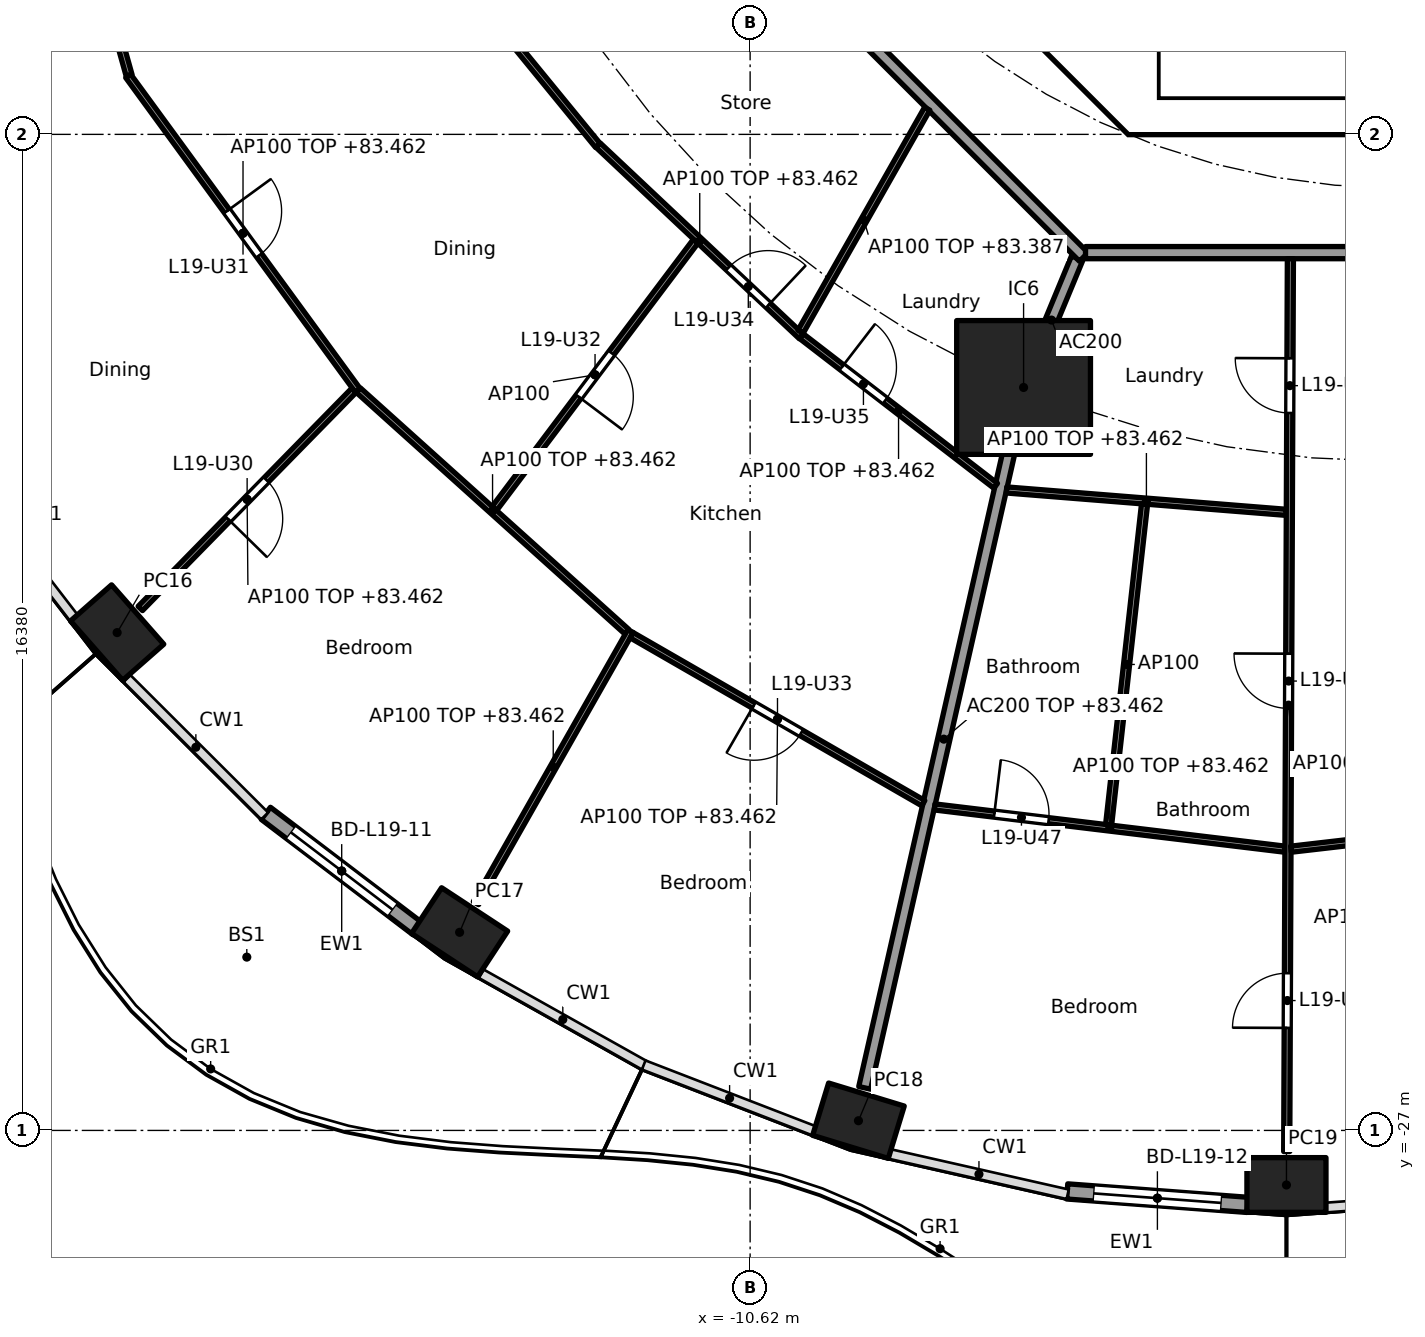
"""IFC4 building model, lengths in metres.
Left out: names, types, materials, properties, quantities, classifications, styles, units other than length and angle.
Written with IfcOpenShell. Run it as: python <this file> out.ifc"""

import sys

from ifc_helpers import new_model, si_unit, direction, frame, frame_2d, origin, origin_2d, place, context, subcontext, project, spatial, polyline, rectangle, hollow_rectangle, outline, extrude, element, fill, save


model = new_model("IFC4")
c1 = context("Model", 3, precision=1e-05, world=origin(), true_north=direction((0.0, 1.0)))
c2 = subcontext(c1, "Body", "Model", "MODEL_VIEW")
j1 = project(units=[si_unit("LENGTHUNIT", "METRE"), si_unit("PLANEANGLEUNIT", "RADIAN")], contexts=[c1])
p1 = place(None, origin())
s1 = spatial("IfcSite", under=j1, at=p1, CompositionType="ELEMENT")
p2 = place(p1, origin())
s2 = spatial("IfcBuilding", under=s1, at=p2, CompositionType="ELEMENT")
p3 = place(p2, frame((0.0, 0.0, 80.7)))
s3 = spatial("IfcBuildingStorey", under=s2, at=p3, CompositionType="ELEMENT", Elevation=80.7)
for number, where, z_axis, x_axis in (
    (1, (-21.03, -18.813, 0.0), (0.0, 0.0, 1.0), (0.66, -0.751, 0.0)),
    (2, (-15.397, -23.742, 0.0), (0.0, 0.0, 1.0), (0.836, -0.549, 0.0)),
    (3, (-8.839, -26.841, 0.0), (0.0, 0.0, 1.0), (0.957, -0.292, 0.0)),
    (4, (-1.8, -27.897, 0.0), (0.0, 0.0, 1.0), (1.0, 0.0, 0.0)),
):
    element("IfcColumn", number, at=place(p3, frame(where, z_axis=z_axis, x_axis=x_axis)), inside=s3, PredefinedType="COLUMN", context=c2, shape_type="SweptSolid", body=[
        extrude(hollow_rectangle(XDim=1.3, YDim=0.9, WallThickness=0.045, at=origin_2d()), origin(), (0.0, 0.0, 1.0), 3.7),
    ])
p4 = place(p3, frame((-6.123, -14.782, 0.0), z_axis=(0.0, 0.0, 1.0), x_axis=(1.0, 0.0, 0.0)))
e5 = element("IfcColumn", 5, at=p4, inside=s3, PredefinedType="COLUMN", context=c2, shape_type="SweptSolid", body=[
    extrude(rectangle(XDim=2.2, YDim=2.2, at=origin_2d()), origin(), (0.0, 0.0, 1.0), 3.7),
])
p5 = place(p3, frame((-16.089, -23.682, 0.0), z_axis=(0.0, 0.0, 1.0), x_axis=(-0.796037575978, 0.605247203736, 0.0)))
e6 = element("IfcWall", 6, at=p5, inside=s3, PredefinedType="SOLIDWALL", context=c2, shape_type="SweptSolid", body=[
    extrude(rectangle(XDim=3.134, YDim=0.25, at=frame_2d((1.567, 0.0))), origin(), (0.0, 0.0, 1.0), 3.44),
])
p6 = place(p5, frame((0.517, 0.0, 0.0)))
e7 = element("IfcOpeningElement", 7, at=p6, cuts=e6, PredefinedType="OPENING", context=c2, shape_type="SweptSolid", body=[
    extrude(rectangle(XDim=2.1, YDim=2.4, at=frame_2d((1.05, 1.2))), frame((0.0, 0.135, 0.0), z_axis=(0.0, -1.0, 0.0), x_axis=(1.0, 0.0, 0.0)), (0.0, 0.0, 1.0), 0.27),
])
p7 = place(p3, frame((-2.439, -28.224, 0.0), z_axis=(0.0, 0.0, 1.0), x_axis=(-0.997225719788, 0.074436978672, 0.0)))
e8 = element("IfcWall", 8, at=p7, inside=s3, PredefinedType="SOLIDWALL", context=c2, shape_type="SweptSolid", body=[
    extrude(rectangle(XDim=2.975, YDim=0.25, at=frame_2d((1.487, 0.0))), origin(), (0.0, 0.0, 1.0), 3.44),
])
p8 = place(p7, frame((0.438, 0.0, 0.0)))
e9 = element("IfcOpeningElement", 9, at=p8, cuts=e8, PredefinedType="OPENING", context=c2, shape_type="SweptSolid", body=[
    extrude(rectangle(XDim=2.1, YDim=2.4, at=frame_2d((1.05, 1.2))), frame((0.0, 0.135, 0.0), z_axis=(0.0, -1.0, 0.0), x_axis=(1.0, 0.0, 0.0)), (0.0, 0.0, 1.0), 0.27),
])
p9 = place(p3, frame((-9.988, -4.613, 0.0), z_axis=(0.0, 0.0, 1.0), x_axis=(0.707106781187, -0.707106781187, 0.0)))
e10 = element("IfcWall", 10, at=p9, inside=s3, PredefinedType="SHEAR", context=c2, shape_type="SweptSolid", body=[
    extrude(rectangle(XDim=7.602, YDim=0.6, at=frame_2d((3.801, 0.0))), origin(), (0.0, 0.0, 1.0), 3.44),
])
p10 = place(p9, frame((6.151, 0.0, 0.0)))
e11 = element("IfcOpeningElement", 11, at=p10, cuts=e10, PredefinedType="OPENING", context=c2, shape_type="SweptSolid", body=[
    extrude(rectangle(XDim=1.1, YDim=2.1, at=frame_2d((0.55, 1.05))), frame((0.0, 0.31, 0.0), z_axis=(0.0, -1.0, 0.0), x_axis=(1.0, 0.0, 0.0)), (0.0, 0.0, 1.0), 0.62),
])
p11 = place(p3, origin())
e12 = element("IfcWall", 12, at=p11, inside=s3, PredefinedType="SHEAR", context=c2, shape_type="SweptSolid", body=[
    extrude(outline(polyline([(-4.152, -10.025), (4.152, -10.025), (4.401, -9.776), (4.825, -10.2), (4.401, -10.625), (-4.401, -10.625), (-4.825, -10.2), (-4.401, -9.776), (-4.152, -10.025)])), origin(), (0.0, 0.0, 1.0), 3.44),
])
p12 = place(p3, origin())
e13 = element("IfcWall", 13, at=p12, inside=s3, PredefinedType="SOLIDWALL", context=c2, shape_type="SweptSolid", body=[
    extrude(outline(polyline([(-3.9, -10.025), (-4.1, -10.025), (-4.1, -7.025), (-3.9, -7.025), (-3.9, -10.025)])), origin(), (0.0, 0.0, 1.0), 3.44),
])
p13 = place(p3, frame((-5.243, -12.657, 0.0), z_axis=(0.0, 0.0, 1.0), x_axis=(-0.382668627144, -0.923885664896, 0.0)))
e14 = element("IfcWall", 14, at=p13, inside=s3, PredefinedType="PARTITIONING", context=c2, shape_type="SweptSolid", body=[
    extrude(rectangle(XDim=2.2, YDim=0.2, at=frame_2d((1.1, 0.0))), origin(), (0.0, 0.0, 1.0), 3.44),
])
p14 = place(p3, frame((-6.134, -14.831, 0.0), z_axis=(0.0, 0.0, 1.0), x_axis=(-0.221225405869, -0.975222702667, 0.0)))
e15 = element("IfcWall", 15, at=p14, inside=s3, PredefinedType="PARTITIONING", context=c2, shape_type="SweptSolid", body=[
    extrude(rectangle(XDim=11.761, YDim=0.2, at=frame_2d((5.88, 0.0))), origin(), (0.0, 0.0, 1.0), 2.762),
])
p15 = place(p3, frame((-12.635, -5.134, 0.0), z_axis=(0.0, 0.0, 1.0), x_axis=(0.707106781187, -0.707106781187, 0.0)))
e16 = element("IfcWall", 16, at=p15, inside=s3, PredefinedType="PARTITIONING", context=c2, shape_type="SweptSolid", body=[
    extrude(rectangle(XDim=10.609, YDim=0.2, at=frame_2d((5.305, 0.0))), origin(), (0.0, 0.0, 1.0), 3.44),
])
p16 = place(p3, frame((-5.104, -12.565, 0.0), z_axis=(0.0, 0.0, 1.0), x_axis=(1.0, 0.0, 0.0)))
e17 = element("IfcWall", 17, at=p16, inside=s3, PredefinedType="PARTITIONING", context=c2, shape_type="SweptSolid", body=[
    extrude(rectangle(XDim=10.409, YDim=0.2, at=frame_2d((5.205, 0.0))), origin(), (0.0, 0.0, 1.0), 3.44),
])
p17 = place(p16, frame((4.604, 0.0, 0.0)))
e18 = element("IfcOpeningElement", 18, at=p17, cuts=e17, PredefinedType="OPENING", context=c2, shape_type="SweptSolid", body=[
    extrude(rectangle(XDim=1.0, YDim=2.1, at=frame_2d((0.5, 1.05))), frame((0.0, 0.11, 0.0), z_axis=(0.0, -1.0, 0.0), x_axis=(1.0, 0.0, 0.0)), (0.0, 0.0, 1.0), 0.22),
])
p18 = place(p3, frame((-22.463, -3.832, 0.0), z_axis=(0.0, 0.0, 1.0), x_axis=(0.269797759333, -0.962917010473, 0.0)))
e19 = element("IfcWall", 19, at=p18, inside=s3, PredefinedType="PARTITIONING", context=c2, shape_type="SweptSolid", body=[
    extrude(rectangle(XDim=6.043, YDim=0.1, at=frame_2d((3.021, 0.0))), origin(), (0.0, 0.0, 1.0), 2.762),
])
p19 = place(p3, frame((-16.277, -6.951, 0.0), z_axis=(0.0, 0.0, 1.0), x_axis=(0.633427340372, -0.773802173988, 0.0)))
e20 = element("IfcWall", 20, at=p19, inside=s3, PredefinedType="PARTITIONING", context=c2, shape_type="SweptSolid", body=[
    extrude(rectangle(XDim=4.979, YDim=0.1, at=frame_2d((2.49, 0.0))), origin(), (0.0, 0.0, 1.0), 2.762),
])
p20 = place(p3, frame((-20.848, -9.658, 0.0), z_axis=(0.0, 0.0, 1.0), x_axis=(0.5895799361, -0.807710033953, 0.0)))
e21 = element("IfcWall", 21, at=p20, inside=s3, PredefinedType="PARTITIONING", context=c2, shape_type="SweptSolid", body=[
    extrude(rectangle(XDim=6.408, YDim=0.1, at=frame_2d((3.204, 0.0))), origin(), (0.0, 0.0, 1.0), 2.762),
])
p21 = place(p20, frame((2.754, 0.0, 0.0)))
e22 = element("IfcOpeningElement", 22, at=p21, cuts=e21, PredefinedType="OPENING", context=c2, shape_type="SweptSolid", body=[
    extrude(rectangle(XDim=0.9, YDim=2.1, at=frame_2d((0.45, 1.05))), frame((0.0, 0.06, 0.0), z_axis=(0.0, -1.0, 0.0), x_axis=(1.0, 0.0, 0.0)), (0.0, 0.0, 1.0), 0.12),
])
p22 = place(p3, frame((-13.118, -10.8, 0.0), z_axis=(0.0, 0.0, 1.0), x_axis=(0.72818280142, -0.685382964273, 0.0)))
e23 = element("IfcWall", 23, at=p22, inside=s3, PredefinedType="PARTITIONING", context=c2, shape_type="SweptSolid", body=[
    extrude(rectangle(XDim=4.586, YDim=0.1, at=frame_2d((2.293, 0.0))), origin(), (0.0, 0.0, 1.0), 2.762),
])
p23 = place(p22, frame((2.94, 0.0, 0.0)))
e24 = element("IfcOpeningElement", 24, at=p23, cuts=e23, PredefinedType="OPENING", context=c2, shape_type="SweptSolid", body=[
    extrude(rectangle(XDim=0.9, YDim=2.1, at=frame_2d((0.45, 1.05))), frame((0.0, 0.06, 0.0), z_axis=(0.0, -1.0, 0.0), x_axis=(1.0, 0.0, 0.0)), (0.0, 0.0, 1.0), 0.12),
])
p24 = place(p3, frame((-17.135, -14.829, 0.0), z_axis=(0.0, 0.0, 1.0), x_axis=(-0.699702869429, -0.714433967917, 0.0)))
e25 = element("IfcWall", 25, at=p24, inside=s3, PredefinedType="PARTITIONING", context=c2, shape_type="SweptSolid", body=[
    extrude(rectangle(XDim=5.022, YDim=0.1, at=frame_2d((2.511, 0.0))), origin(), (0.0, 0.0, 1.0), 2.762),
])
p25 = place(p24, frame((2.061, 0.0, 0.0)))
e26 = element("IfcOpeningElement", 26, at=p25, cuts=e25, PredefinedType="OPENING", context=c2, shape_type="SweptSolid", body=[
    extrude(rectangle(XDim=0.9, YDim=2.1, at=frame_2d((0.45, 1.05))), frame((0.0, 0.06, 0.0), z_axis=(0.0, -1.0, 0.0), x_axis=(1.0, 0.0, 0.0)), (0.0, 0.0, 1.0), 0.12),
])
p26 = place(p3, frame((-17.063, -14.827, 0.0), z_axis=(0.0, 0.0, 1.0), x_axis=(0.743478142868, -0.668760234373, 0.0)))
e27 = element("IfcWall", 27, at=p26, inside=s3, PredefinedType="PARTITIONING", context=c2, shape_type="SweptSolid", body=[
    extrude(rectangle(XDim=5.937, YDim=0.1, at=frame_2d((2.969, 0.0))), origin(), (0.0, 0.0, 1.0), 2.762),
])
p27 = place(p3, frame((-11.515, -12.377, 0.0), z_axis=(0.0, 0.0, 1.0), x_axis=(-0.60163860397, -0.798768420891, 0.0)))
e28 = element("IfcWall", 28, at=p27, inside=s3, PredefinedType="PARTITIONING", context=c2, shape_type="SweptSolid", body=[
    extrude(rectangle(XDim=5.502, YDim=0.1, at=frame_2d((2.751, 0.0))), origin(), (0.0, 0.0, 1.0), 3.44),
])
p28 = place(p27, frame((2.301, 0.0, 0.0)))
e29 = element("IfcOpeningElement", 29, at=p28, cuts=e28, PredefinedType="OPENING", context=c2, shape_type="SweptSolid", body=[
    extrude(rectangle(XDim=0.9, YDim=2.1, at=frame_2d((0.45, 1.05))), frame((0.0, 0.06, 0.0), z_axis=(0.0, -1.0, 0.0), x_axis=(1.0, 0.0, 0.0)), (0.0, 0.0, 1.0), 0.12),
])
p29 = place(p3, frame((-7.707, -10.198, 0.0), z_axis=(0.0, 0.0, 1.0), x_axis=(-0.493986531217, -0.869469554945, 0.0)))
e30 = element("IfcWall", 30, at=p29, inside=s3, PredefinedType="PARTITIONING", context=c2, shape_type="SweptSolid", body=[
    extrude(rectangle(XDim=4.217, YDim=0.1, at=frame_2d((2.109, 0.0))), origin(), (0.0, 0.0, 1.0), 2.687),
])
p30 = place(p3, frame((-9.775, -13.939, 0.0), z_axis=(0.0, 0.0, 1.0), x_axis=(0.792162117554, -0.610310723741, 0.0)))
e31 = element("IfcWall", 31, at=p30, inside=s3, PredefinedType="PARTITIONING", context=c2, shape_type="SweptSolid", body=[
    extrude(rectangle(XDim=4.03, YDim=0.1, at=frame_2d((2.015, 0.0))), origin(), (0.0, 0.0, 1.0), 2.762),
])
p31 = place(p30, frame((0.836, 0.0, 0.0)))
e32 = element("IfcOpeningElement", 32, at=p31, cuts=e31, PredefinedType="OPENING", context=c2, shape_type="SweptSolid", body=[
    extrude(rectangle(XDim=0.9, YDim=2.1, at=frame_2d((0.45, 1.05))), frame((0.0, 0.06, 0.0), z_axis=(0.0, -1.0, 0.0), x_axis=(1.0, 0.0, 0.0)), (0.0, 0.0, 1.0), 0.12),
])
p32 = place(p3, frame((-12.587, -18.787, 0.0), z_axis=(0.0, 0.0, 1.0), x_axis=(-0.493966211317, -0.869481099321, 0.0)))
e33 = element("IfcWall", 33, at=p32, inside=s3, PredefinedType="PARTITIONING", context=c2, shape_type="SweptSolid", body=[
    extrude(rectangle(XDim=5.146, YDim=0.1, at=frame_2d((2.573, 0.0))), origin(), (0.0, 0.0, 1.0), 2.762),
])
p33 = place(p3, frame((-12.568, -18.856, 0.0), z_axis=(0.0, 0.0, 1.0), x_axis=(0.866533437451, -0.499119025664, 0.0)))
e34 = element("IfcWall", 34, at=p33, inside=s3, PredefinedType="PARTITIONING", context=c2, shape_type="SweptSolid", body=[
    extrude(rectangle(XDim=5.535, YDim=0.1, at=frame_2d((2.768, 0.0))), origin(), (0.0, 0.0, 1.0), 2.762),
])
p34 = place(p33, frame((2.317, 0.0, 0.0)))
e35 = element("IfcOpeningElement", 35, at=p34, cuts=e34, PredefinedType="OPENING", context=c2, shape_type="SweptSolid", body=[
    extrude(rectangle(XDim=0.9, YDim=2.1, at=frame_2d((0.45, 1.05))), frame((0.0, 0.06, 0.0), z_axis=(0.0, -1.0, 0.0), x_axis=(1.0, 0.0, 0.0)), (0.0, 0.0, 1.0), 0.12),
])
p35 = place(p3, frame((-6.404, -16.468, 0.0), z_axis=(0.0, 0.0, 1.0), x_axis=(0.996818808981, -0.079701079432, 0.0)))
e36 = element("IfcWall", 36, at=p35, inside=s3, PredefinedType="PARTITIONING", context=c2, shape_type="SweptSolid", body=[
    extrude(rectangle(XDim=4.616, YDim=0.1, at=frame_2d((2.308, 0.0))), origin(), (0.0, 0.0, 1.0), 2.762),
])
p36 = place(p3, frame((-7.586, -21.68, 0.0), z_axis=(0.0, 0.0, 1.0), x_axis=(0.992810189026, -0.119699325668, 0.0)))
e37 = element("IfcWall", 37, at=p36, inside=s3, PredefinedType="PARTITIONING", context=c2, shape_type="SweptSolid", body=[
    extrude(rectangle(XDim=5.803, YDim=0.1, at=frame_2d((2.901, 0.0))), origin(), (0.0, 0.0, 1.0), 2.762),
])
p37 = place(p36, frame((0.988, 0.0, 0.0)))
e38 = element("IfcOpeningElement", 38, at=p37, cuts=e37, PredefinedType="OPENING", context=c2, shape_type="SweptSolid", body=[
    extrude(rectangle(XDim=0.9, YDim=2.1, at=frame_2d((0.45, 1.05))), frame((0.0, 0.06, 0.0), z_axis=(0.0, -1.0, 0.0), x_axis=(1.0, 0.0, 0.0)), (0.0, 0.0, 1.0), 0.12),
])
p38 = place(p3, frame((-4.134, -16.699, 0.0), z_axis=(0.0, 0.0, 1.0), x_axis=(-0.111340048649, -0.993782367305, 0.0)))
e39 = element("IfcWall", 39, at=p38, inside=s3, PredefinedType="PARTITIONING", context=c2, shape_type="SweptSolid", body=[
    extrude(rectangle(XDim=5.309, YDim=0.1, at=frame_2d((2.654, 0.0))), origin(), (0.0, 0.0, 1.0), 3.44),
])
p39 = place(p3, frame((-1.735, -12.665, 0.0), z_axis=(0.0, 0.0, 1.0), x_axis=(-0.004107048833, -0.999991566039, 0.0)))
e40 = element("IfcWall", 40, at=p39, inside=s3, PredefinedType="PARTITIONING", context=c2, shape_type="SweptSolid", body=[
    extrude(rectangle(XDim=14.683, YDim=0.1, at=frame_2d((7.341, 0.0))), origin(), (0.0, 0.0, 1.0), 2.687),
])
p40 = place(p39, frame((1.637, 0.0, 0.0)))
e41 = element("IfcOpeningElement", 41, at=p40, cuts=e40, PredefinedType="OPENING", context=c2, shape_type="SweptSolid", body=[
    extrude(rectangle(XDim=0.9, YDim=2.1, at=frame_2d((0.45, 1.05))), frame((0.0, 0.06, 0.0), z_axis=(0.0, -1.0, 0.0), x_axis=(1.0, 0.0, 0.0)), (0.0, 0.0, 1.0), 0.12),
])
p41 = place(p39, frame((6.496, 0.0, 0.0)))
e42 = element("IfcOpeningElement", 42, at=p41, cuts=e40, PredefinedType="OPENING", context=c2, shape_type="SweptSolid", body=[
    extrude(rectangle(XDim=0.9, YDim=2.1, at=frame_2d((0.45, 1.05))), frame((0.0, 0.06, 0.0), z_axis=(0.0, -1.0, 0.0), x_axis=(1.0, 0.0, 0.0)), (0.0, 0.0, 1.0), 0.12),
])
p42 = place(p39, frame((11.75, 0.0, 0.0)))
e43 = element("IfcOpeningElement", 43, at=p42, cuts=e40, PredefinedType="OPENING", context=c2, shape_type="SweptSolid", body=[
    extrude(rectangle(XDim=0.9, YDim=2.1, at=frame_2d((0.45, 1.05))), frame((0.0, 0.06, 0.0), z_axis=(0.0, -1.0, 0.0), x_axis=(1.0, 0.0, 0.0)), (0.0, 0.0, 1.0), 0.12),
])
p43 = place(p3, frame((-1.726, -22.375, 0.0), z_axis=(0.0, 0.0, 1.0), x_axis=(0.99339223329, 0.114768771187, 0.0)))
e44 = element("IfcWall", 44, at=p43, inside=s3, PredefinedType="PARTITIONING", context=c2, shape_type="SweptSolid", body=[
    extrude(rectangle(XDim=5.701, YDim=0.1, at=frame_2d((2.851, 0.0))), origin(), (0.0, 0.0, 1.0), 2.762),
])
p44 = place(p43, frame((2.4, 0.0, 0.0)))
e45 = element("IfcOpeningElement", 45, at=p44, cuts=e44, PredefinedType="OPENING", context=c2, shape_type="SweptSolid", body=[
    extrude(rectangle(XDim=0.9, YDim=2.1, at=frame_2d((0.45, 1.05))), frame((0.0, 0.06, 0.0), z_axis=(0.0, -1.0, 0.0), x_axis=(1.0, 0.0, 0.0)), (0.0, 0.0, 1.0), 0.12),
])
p45 = place(p6, origin())
e46 = element("IfcDoor", 46, at=p45, inside=s3, OperationType="SLIDING_TO_LEFT", PredefinedType="DOOR", context=c2, shape_type="SweptSolid", body=[
    extrude(rectangle(XDim=2.1, YDim=2.4, at=frame_2d((1.05, 1.2))), frame((0.0, 0.025, 0.0), z_axis=(0.0, -1.0, 0.0), x_axis=(1.0, 0.0, 0.0)), (0.0, 0.0, 1.0), 0.05),
])
fill(e7, e46)
p46 = place(p8, origin())
e47 = element("IfcDoor", 47, at=p46, inside=s3, OperationType="SLIDING_TO_LEFT", PredefinedType="DOOR", context=c2, shape_type="SweptSolid", body=[
    extrude(rectangle(XDim=2.1, YDim=2.4, at=frame_2d((1.05, 1.2))), frame((0.0, 0.025, 0.0), z_axis=(0.0, -1.0, 0.0), x_axis=(1.0, 0.0, 0.0)), (0.0, 0.0, 1.0), 0.05),
])
fill(e9, e47)
p47 = place(p10, origin())
e48 = element("IfcDoor", 48, at=p47, inside=s3, OperationType="SINGLE_SWING_LEFT", PredefinedType="DOOR", context=c2, shape_type="SweptSolid", body=[
    extrude(rectangle(XDim=1.1, YDim=2.1, at=frame_2d((0.55, 1.05))), frame((0.0, 0.025, 0.0), z_axis=(0.0, -1.0, 0.0), x_axis=(1.0, 0.0, 0.0)), (0.0, 0.0, 1.0), 0.05),
])
fill(e11, e48)
p48 = place(p25, origin())
e49 = element("IfcDoor", 49, at=p48, inside=s3, OperationType="SINGLE_SWING_RIGHT", PredefinedType="DOOR", context=c2, shape_type="SweptSolid", body=[
    extrude(rectangle(XDim=0.9, YDim=2.1, at=frame_2d((0.45, 1.05))), frame((0.0, 0.025, 0.0), z_axis=(0.0, -1.0, 0.0), x_axis=(1.0, 0.0, 0.0)), (0.0, 0.0, 1.0), 0.05),
])
fill(e26, e49)
p49 = place(p21, origin())
e50 = element("IfcDoor", 50, at=p49, inside=s3, OperationType="SINGLE_SWING_LEFT", PredefinedType="DOOR", context=c2, shape_type="SweptSolid", body=[
    extrude(rectangle(XDim=0.9, YDim=2.1, at=frame_2d((0.45, 1.05))), frame((0.0, 0.025, 0.0), z_axis=(0.0, -1.0, 0.0), x_axis=(1.0, 0.0, 0.0)), (0.0, 0.0, 1.0), 0.05),
])
fill(e22, e50)
p50 = place(p28, origin())
e51 = element("IfcDoor", 51, at=p50, inside=s3, OperationType="SINGLE_SWING_RIGHT", PredefinedType="DOOR", context=c2, shape_type="SweptSolid", body=[
    extrude(rectangle(XDim=0.9, YDim=2.1, at=frame_2d((0.45, 1.05))), frame((0.0, 0.025, 0.0), z_axis=(0.0, -1.0, 0.0), x_axis=(1.0, 0.0, 0.0)), (0.0, 0.0, 1.0), 0.05),
])
fill(e29, e51)
p51 = place(p34, frame((0.9, 0.0, 0.0), x_axis=(-1.0, 0.0, 0.0)))
e52 = element("IfcDoor", 52, at=p51, inside=s3, OperationType="SINGLE_SWING_RIGHT", PredefinedType="DOOR", context=c2, shape_type="SweptSolid", body=[
    extrude(rectangle(XDim=0.9, YDim=2.1, at=frame_2d((0.45, 1.05))), frame((0.0, 0.025, 0.0), z_axis=(0.0, -1.0, 0.0), x_axis=(1.0, 0.0, 0.0)), (0.0, 0.0, 1.0), 0.05),
])
fill(e35, e52)
p52 = place(p23, origin())
e53 = element("IfcDoor", 53, at=p52, inside=s3, OperationType="SINGLE_SWING_RIGHT", PredefinedType="DOOR", context=c2, shape_type="SweptSolid", body=[
    extrude(rectangle(XDim=0.9, YDim=2.1, at=frame_2d((0.45, 1.05))), frame((0.0, 0.025, 0.0), z_axis=(0.0, -1.0, 0.0), x_axis=(1.0, 0.0, 0.0)), (0.0, 0.0, 1.0), 0.05),
])
fill(e24, e53)
p53 = place(p31, origin())
e54 = element("IfcDoor", 54, at=p53, inside=s3, OperationType="SINGLE_SWING_LEFT", PredefinedType="DOOR", context=c2, shape_type="SweptSolid", body=[
    extrude(rectangle(XDim=0.9, YDim=2.1, at=frame_2d((0.45, 1.05))), frame((0.0, 0.025, 0.0), z_axis=(0.0, -1.0, 0.0), x_axis=(1.0, 0.0, 0.0)), (0.0, 0.0, 1.0), 0.05),
])
fill(e32, e54)
p54 = place(p40, frame((0.9, 0.0, 0.0), x_axis=(-1.0, 0.0, 0.0)))
e55 = element("IfcDoor", 55, at=p54, inside=s3, OperationType="SINGLE_SWING_RIGHT", PredefinedType="DOOR", context=c2, shape_type="SweptSolid", body=[
    extrude(rectangle(XDim=0.9, YDim=2.1, at=frame_2d((0.45, 1.05))), frame((0.0, 0.025, 0.0), z_axis=(0.0, -1.0, 0.0), x_axis=(1.0, 0.0, 0.0)), (0.0, 0.0, 1.0), 0.05),
])
fill(e41, e55)
p55 = place(p41, frame((0.9, 0.0, 0.0), x_axis=(-1.0, 0.0, 0.0)))
e56 = element("IfcDoor", 56, at=p55, inside=s3, OperationType="SINGLE_SWING_RIGHT", PredefinedType="DOOR", context=c2, shape_type="SweptSolid", body=[
    extrude(rectangle(XDim=0.9, YDim=2.1, at=frame_2d((0.45, 1.05))), frame((0.0, 0.025, 0.0), z_axis=(0.0, -1.0, 0.0), x_axis=(1.0, 0.0, 0.0)), (0.0, 0.0, 1.0), 0.05),
])
fill(e42, e56)
p56 = place(p42, frame((0.9, 0.0, 0.0), x_axis=(-1.0, 0.0, 0.0)))
e57 = element("IfcDoor", 57, at=p56, inside=s3, OperationType="SINGLE_SWING_LEFT", PredefinedType="DOOR", context=c2, shape_type="SweptSolid", body=[
    extrude(rectangle(XDim=0.9, YDim=2.1, at=frame_2d((0.45, 1.05))), frame((0.0, 0.025, 0.0), z_axis=(0.0, -1.0, 0.0), x_axis=(1.0, 0.0, 0.0)), (0.0, 0.0, 1.0), 0.05),
])
fill(e43, e57)
p57 = place(p37, origin())
e58 = element("IfcDoor", 58, at=p57, inside=s3, OperationType="SINGLE_SWING_LEFT", PredefinedType="DOOR", context=c2, shape_type="SweptSolid", body=[
    extrude(rectangle(XDim=0.9, YDim=2.1, at=frame_2d((0.45, 1.05))), frame((0.0, 0.025, 0.0), z_axis=(0.0, -1.0, 0.0), x_axis=(1.0, 0.0, 0.0)), (0.0, 0.0, 1.0), 0.05),
])
fill(e38, e58)
save(model, sys.argv[1])
